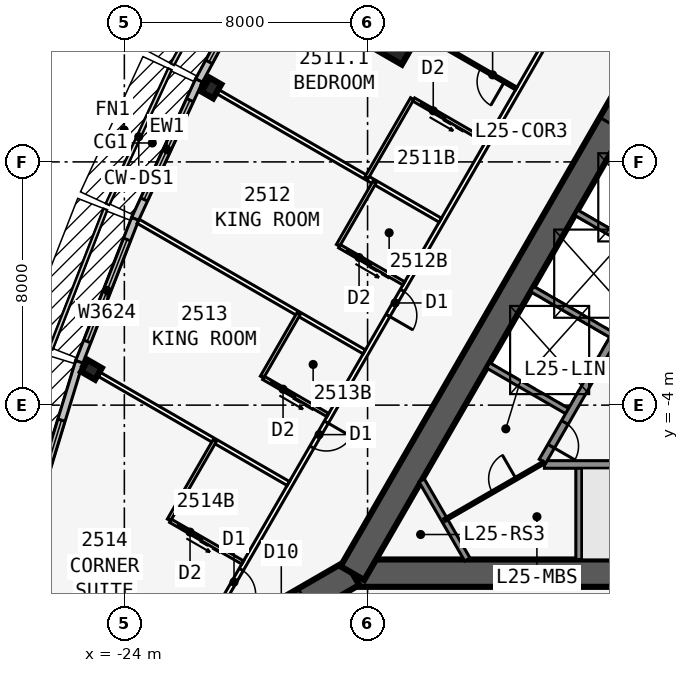
"""IFC4 building model, lengths in metres.
Left out: names, types, materials, properties, quantities, classifications, styles, units other than length and angle.
Written with IfcOpenShell. Run it as: python <this file> out.ifc"""

import sys

from ifc_helpers import new_model, si_unit, direction, frame, frame_2d, origin, origin_2d, place, context, subcontext, project, spatial, rectangle, i_section, extrude, element, fill, save


model = new_model("IFC4")
c1 = context("Model", 3, precision=1e-05, world=origin(), true_north=direction((0.0, 1.0)))
c2 = subcontext(c1, "Body", "Model", "MODEL_VIEW")
j1 = project(units=[si_unit("LENGTHUNIT", "METRE"), si_unit("PLANEANGLEUNIT", "RADIAN")], contexts=[c1])
p1 = place(None, origin())
s1 = spatial("IfcSite", under=j1, at=p1, CompositionType="ELEMENT")
p2 = place(p1, origin())
s2 = spatial("IfcBuilding", under=s1, at=p2, CompositionType="ELEMENT")
p3 = place(p2, frame((0.0, 0.0, 96.5)))
s3 = spatial("IfcBuildingStorey", under=s2, at=p3, CompositionType="ELEMENT", Elevation=96.5)
p4 = place(p3, frame((-16.5, -9.526, 0.0), z_axis=(0.0, 0.0, 1.0), x_axis=(1.0, 0.0, 0.0)))
e1 = element("IfcWall", 1, at=p4, inside=s3, PredefinedType="SHEAR", context=c2, shape_type="SweptSolid", body=[
    extrude(rectangle(XDim=33.0, YDim=0.9, at=frame_2d((16.5, 0.0))), origin(), (0.0, 0.0, 1.0), 3.4),
])
p5 = place(p4, frame((14.05, 0.0, 0.0)))
e2 = element("IfcOpeningElement", 2, at=p5, cuts=e1, PredefinedType="OPENING", context=c2, shape_type="SweptSolid", body=[
    extrude(rectangle(XDim=1.8, YDim=2.13, at=frame_2d((0.9, 1.065))), frame((0.0, 0.46, 0.0), z_axis=(0.0, -1.0, 0.0), x_axis=(1.0, 0.0, 0.0)), (0.0, 0.0, 1.0), 0.92),
])
p6 = place(p3, frame((-10.183, -5.951, 0.0), z_axis=(0.0, 0.0, 1.0), x_axis=(1.0, 0.0, 0.0)))
e3 = element("IfcWall", 3, at=p6, inside=s3, PredefinedType="SOLIDWALL", context=c2, shape_type="SweptSolid", body=[
    extrude(rectangle(XDim=7.633, YDim=0.25, at=frame_2d((3.816, 0.0))), origin(), (0.0, 0.0, 1.0), 3.235),
])
p7 = place(p3, frame((-9.05, -5.951, 0.0), z_axis=(0.0, 0.0, 1.0), x_axis=(0.0, -1.0, 0.0)))
e4 = element("IfcWall", 4, at=p7, inside=s3, PredefinedType="SOLIDWALL", context=c2, shape_type="SweptSolid", body=[
    extrude(rectangle(XDim=3.125, YDim=0.2, at=frame_2d((1.562, 0.0))), origin(), (0.0, 0.0, 1.0), 3.235),
])
p8 = place(p3, frame((0.0, 19.052, 0.0), z_axis=(0.0, 0.0, 1.0), x_axis=(-0.499999749417, -0.866025548458, 0.0)))
e5 = element("IfcWall", 5, at=p8, inside=s3, PredefinedType="SHEAR", context=c2, shape_type="SweptSolid", body=[
    extrude(rectangle(XDim=33.0, YDim=0.9, at=frame_2d((16.5, 0.0))), origin(), (0.0, 0.0, 1.0), 3.4),
])
p9 = place(p8, frame((14.15, 0.0, 0.0)))
e6 = element("IfcOpeningElement", 6, at=p9, cuts=e5, PredefinedType="OPENING", context=c2, shape_type="SweptSolid", body=[
    extrude(rectangle(XDim=1.8, YDim=2.13, at=frame_2d((0.9, 1.065))), frame((0.0, 0.46, 0.0), z_axis=(0.0, -1.0, 0.0), x_axis=(1.0, 0.0, 0.0)), (0.0, 0.0, 1.0), 0.92),
])
p10 = place(p8, frame((12.6, 0.0, 0.0)))
e7 = element("IfcOpeningElement", 7, at=p10, cuts=e5, PredefinedType="OPENING", context=c2, shape_type="SweptSolid", body=[
    extrude(rectangle(XDim=1.0, YDim=2.13, at=frame_2d((0.5, 1.065))), frame((0.0, 0.46, 0.0), z_axis=(0.0, -1.0, 0.0), x_axis=(1.0, 0.0, 0.0)), (0.0, 0.0, 1.0), 0.92),
])
p11 = place(p3, frame((-4.929, 3.365, 0.0), z_axis=(0.0, 0.0, 1.0), x_axis=(-0.499991433582, -0.866030349552, 0.0)))
e8 = element("IfcWall", 8, at=p11, inside=s3, PredefinedType="SOLIDWALL", context=c2, shape_type="SweptSolid", body=[
    extrude(rectangle(XDim=10.633, YDim=0.25, at=frame_2d((5.316, 0.0))), origin(), (0.0, 0.0, 1.0), 3.235),
])
p12 = place(p11, frame((9.164, 0.0, 0.0)))
e9 = element("IfcOpeningElement", 9, at=p12, cuts=e8, PredefinedType="OPENING", context=c2, shape_type="SweptSolid", body=[
    extrude(rectangle(XDim=0.9, YDim=2.13, at=frame_2d((0.45, 1.065))), frame((0.0, 0.135, 0.0), z_axis=(0.0, -1.0, 0.0), x_axis=(1.0, 0.0, 0.0)), (0.0, 0.0, 1.0), 0.27),
])
for number, where, z_axis, x_axis in (
    (10, (-6.429, 0.767, 0.0), (0.0, 0.0, 1.0), (-0.866, 0.5, 0.0)),
    (11, (-7.879, -1.744, 0.0), (0.0, 0.0, 1.0), (-0.866, 0.5, 0.0)),
    (12, (-9.329, -4.256, 0.0), (0.0, 0.0, 1.0), (-0.866, 0.5, 0.0)),
):
    element("IfcWall", number, at=place(p3, frame(where, z_axis=z_axis, x_axis=x_axis)), inside=s3, PredefinedType="SOLIDWALL", context=c2, shape_type="SweptSolid", body=[
        extrude(rectangle(XDim=3.125, YDim=0.2, at=frame_2d((1.562, 0.0))), origin(), (0.0, 0.0, 1.0), 3.235),
    ])
p13 = place(p3, frame((-16.5, -9.526, 0.0), z_axis=(0.0, 0.0, 1.0), x_axis=(-0.866031398331, -0.499989616998, 0.0)))
e13 = element("IfcWall", 13, at=p13, inside=s3, PredefinedType="SHEAR", context=c2, shape_type="SweptSolid", body=[
    extrude(rectangle(XDim=4.746, YDim=0.9, at=frame_2d((2.373, 0.0))), origin(), (0.0, 0.0, 1.0), 3.4),
])
p14 = place(p13, frame((1.8, 0.0, 0.0)))
e14 = element("IfcOpeningElement", 14, at=p14, cuts=e13, PredefinedType="OPENING", context=c2, shape_type="SweptSolid", body=[
    extrude(rectangle(XDim=1.8, YDim=2.13, at=frame_2d((0.9, 1.065))), frame((0.0, 0.46, 0.0), z_axis=(0.0, -1.0, 0.0), x_axis=(1.0, 0.0, 0.0)), (0.0, 0.0, 1.0), 0.92),
])
for number, where, z_axis, x_axis in (
    (15, (-21.137, 6.43, 0.0), (0.0, 0.0, 1.0), (-0.866, 0.5, 0.0)),
    (16, (-25.083, -2.839, 0.0), (0.0, 0.0, 1.0), (-0.5, -0.866, 0.0)),
):
    element("IfcColumn", number, at=place(p3, frame(where, z_axis=z_axis, x_axis=x_axis)), inside=s3, PredefinedType="COLUMN", context=c2, shape_type="SweptSolid", body=[
        extrude(i_section(OverallWidth=0.442, OverallDepth=0.531, WebThickness=0.066, FlangeThickness=0.106, at=origin_2d()), origin(), (0.0, 0.0, 1.0), 3.4),
    ])
p15 = place(p3, frame((-15.312, 8.84, 0.0), z_axis=(0.0, 0.0, 1.0), x_axis=(-0.866025403784, 0.5, 0.0)))
e17 = element("IfcColumn", 17, at=p15, inside=s3, PredefinedType="COLUMN", context=c2, shape_type="SweptSolid", body=[
    extrude(rectangle(XDim=2.4, YDim=2.4, at=origin_2d()), origin(), (0.0, 0.0, 1.0), 3.4),
])
p16 = place(p3, frame((-19.178, 11.077, 0.0), z_axis=(0.0, 0.0, 1.0), x_axis=(-0.473412820489, -0.880840678782, 0.0)))
e18 = element("IfcWall", 18, at=p16, inside=s3, PredefinedType="STANDARD", context=c2, shape_type="SweptSolid", body=[
    extrude(rectangle(XDim=5.002, YDim=0.25, at=frame_2d((2.501, 0.0))), origin(), (0.0, 0.0, 1.0), 3.235),
])
p17 = place(p16, frame((0.701, 0.0, 0.45)))
e19 = element("IfcOpeningElement", 19, at=p17, cuts=e18, PredefinedType="OPENING", context=c2, shape_type="SweptSolid", body=[
    extrude(rectangle(XDim=3.6, YDim=2.4, at=frame_2d((1.8, 1.2))), frame((0.0, 0.135, 0.0), z_axis=(0.0, -1.0, 0.0), x_axis=(1.0, 0.0, 0.0)), (0.0, 0.0, 1.0), 0.27),
])
p18 = place(p3, frame((-21.543, 6.678, 0.0), z_axis=(0.0, 0.0, 1.0), x_axis=(-0.419203100754, -0.907892482796, 0.0)))
e20 = element("IfcWall", 20, at=p18, inside=s3, PredefinedType="STANDARD", context=c2, shape_type="SweptSolid", body=[
    extrude(rectangle(XDim=5.021, YDim=0.25, at=frame_2d((2.51, 0.0))), origin(), (0.0, 0.0, 1.0), 3.235),
])
p19 = place(p18, frame((0.71, 0.0, 0.45)))
e21 = element("IfcOpeningElement", 21, at=p19, cuts=e20, PredefinedType="OPENING", context=c2, shape_type="SweptSolid", body=[
    extrude(rectangle(XDim=3.6, YDim=2.4, at=frame_2d((1.8, 1.2))), frame((0.0, 0.135, 0.0), z_axis=(0.0, -1.0, 0.0), x_axis=(1.0, 0.0, 0.0)), (0.0, 0.0, 1.0), 0.27),
])
p20 = place(p3, frame((-23.645, 2.126, 0.0), z_axis=(0.0, 0.0, 1.0), x_axis=(-0.364013463868, -0.931393685894, 0.0)))
e22 = element("IfcWall", 22, at=p20, inside=s3, PredefinedType="STANDARD", context=c2, shape_type="SweptSolid", body=[
    extrude(rectangle(XDim=5.058, YDim=0.25, at=frame_2d((2.529, 0.0))), origin(), (0.0, 0.0, 1.0), 3.235),
])
p21 = place(p20, frame((0.729, 0.0, 0.45)))
e23 = element("IfcOpeningElement", 23, at=p21, cuts=e22, PredefinedType="OPENING", context=c2, shape_type="SweptSolid", body=[
    extrude(rectangle(XDim=3.6, YDim=2.4, at=frame_2d((1.8, 1.2))), frame((0.0, 0.135, 0.0), z_axis=(0.0, -1.0, 0.0), x_axis=(1.0, 0.0, 0.0)), (0.0, 0.0, 1.0), 0.27),
])
p22 = place(p3, frame((-25.483, -2.575, 0.0), z_axis=(0.0, 0.0, 1.0), x_axis=(-0.2919790669, -0.956424709265, 0.0)))
e24 = element("IfcWall", 24, at=p22, inside=s3, PredefinedType="STANDARD", context=c2, shape_type="SweptSolid", body=[
    extrude(rectangle(XDim=8.211, YDim=0.25, at=frame_2d((4.105, 0.0))), origin(), (0.0, 0.0, 1.0), 3.235),
])
p23 = place(p22, frame((2.006, 0.0, 0.45)))
e25 = element("IfcOpeningElement", 25, at=p23, cuts=e24, PredefinedType="OPENING", context=c2, shape_type="SweptSolid", body=[
    extrude(rectangle(XDim=4.2, YDim=2.4, at=frame_2d((2.1, 1.2))), frame((0.0, 0.135, 0.0), z_axis=(0.0, -1.0, 0.0), x_axis=(1.0, 0.0, 0.0)), (0.0, 0.0, 1.0), 0.27),
])
p24 = place(p3, frame((-0.5, 24.636, 0.0), z_axis=(0.0, 0.0, 1.0), x_axis=(-0.500001915564, -0.86602429783, 0.0)))
e26 = element("IfcWall", 26, at=p24, inside=s3, PredefinedType="PARTITIONING", context=c2, shape_type="SweptSolid", body=[
    extrude(rectangle(XDim=42.172, YDim=0.15, at=frame_2d((21.086, 0.0))), origin(), (0.0, 0.0, 1.0), 3.235),
])
p25 = place(p24, frame((1.911, 0.0, 0.0)))
e27 = element("IfcOpeningElement", 27, at=p25, cuts=e26, PredefinedType="OPENING", context=c2, shape_type="SweptSolid", body=[
    extrude(rectangle(XDim=0.95, YDim=2.13, at=frame_2d((0.475, 1.065))), frame((0.0, 0.085, 0.0), z_axis=(0.0, -1.0, 0.0), x_axis=(1.0, 0.0, 0.0)), (0.0, 0.0, 1.0), 0.17),
])
p26 = place(p24, frame((8.111, 0.0, 0.0)))
e28 = element("IfcOpeningElement", 28, at=p26, cuts=e26, PredefinedType="OPENING", context=c2, shape_type="SweptSolid", body=[
    extrude(rectangle(XDim=0.95, YDim=2.13, at=frame_2d((0.475, 1.065))), frame((0.0, 0.085, 0.0), z_axis=(0.0, -1.0, 0.0), x_axis=(1.0, 0.0, 0.0)), (0.0, 0.0, 1.0), 0.17),
])
p27 = place(p24, frame((18.111, 0.0, 0.0)))
e29 = element("IfcOpeningElement", 29, at=p27, cuts=e26, PredefinedType="OPENING", context=c2, shape_type="SweptSolid", body=[
    extrude(rectangle(XDim=0.95, YDim=2.13, at=frame_2d((0.475, 1.065))), frame((0.0, 0.085, 0.0), z_axis=(0.0, -1.0, 0.0), x_axis=(1.0, 0.0, 0.0)), (0.0, 0.0, 1.0), 0.17),
])
p28 = place(p24, frame((28.711, 0.0, 0.0)))
e30 = element("IfcOpeningElement", 30, at=p28, cuts=e26, PredefinedType="OPENING", context=c2, shape_type="SweptSolid", body=[
    extrude(rectangle(XDim=0.95, YDim=2.13, at=frame_2d((0.475, 1.065))), frame((0.0, 0.085, 0.0), z_axis=(0.0, -1.0, 0.0), x_axis=(1.0, 0.0, 0.0)), (0.0, 0.0, 1.0), 0.17),
])
p29 = place(p24, frame((33.711, 0.0, 0.0)))
e31 = element("IfcOpeningElement", 31, at=p29, cuts=e26, PredefinedType="OPENING", context=c2, shape_type="SweptSolid", body=[
    extrude(rectangle(XDim=0.95, YDim=2.13, at=frame_2d((0.475, 1.065))), frame((0.0, 0.085, 0.0), z_axis=(0.0, -1.0, 0.0), x_axis=(1.0, 0.0, 0.0)), (0.0, 0.0, 1.0), 0.17),
])
p30 = place(p24, frame((39.311, 0.0, 0.0)))
e32 = element("IfcOpeningElement", 32, at=p30, cuts=e26, PredefinedType="OPENING", context=c2, shape_type="SweptSolid", body=[
    extrude(rectangle(XDim=0.95, YDim=2.13, at=frame_2d((0.475, 1.065))), frame((0.0, 0.085, 0.0), z_axis=(0.0, -1.0, 0.0), x_axis=(1.0, 0.0, 0.0)), (0.0, 0.0, 1.0), 0.17),
])
p31 = place(p3, frame((-11.108, 6.413, 0.0), z_axis=(0.0, 0.0, 1.0), x_axis=(-0.866022450903, 0.500005114506, 0.0)))
e33 = element("IfcWall", 33, at=p31, inside=s3, PredefinedType="PARTITIONING", context=c2, shape_type="SweptSolid", body=[
    extrude(rectangle(XDim=9.196, YDim=0.1, at=frame_2d((4.598, 0.0))), origin(), (0.0, 0.0, 1.0), 2.389),
])
p32 = place(p31, frame((0.45, 0.0, 0.0)))
e34 = element("IfcOpeningElement", 34, at=p32, cuts=e33, PredefinedType="OPENING", context=c2, shape_type="SweptSolid", body=[
    extrude(rectangle(XDim=0.9, YDim=2.13, at=frame_2d((0.45, 1.065))), frame((0.0, 0.06, 0.0), z_axis=(0.0, -1.0, 0.0), x_axis=(1.0, 0.0, 0.0)), (0.0, 0.0, 1.0), 0.12),
])
p33 = place(p3, frame((-13.608, 2.083, 0.0), z_axis=(0.0, 0.0, 1.0), x_axis=(-0.866028232062, 0.499995101247, 0.0)))
e35 = element("IfcWall", 35, at=p33, inside=s3, PredefinedType="PARTITIONING", context=c2, shape_type="SweptSolid", body=[
    extrude(rectangle(XDim=9.043, YDim=0.15, at=frame_2d((4.521, 0.0))), origin(), (0.0, 0.0, 1.0), 2.389),
])
p34 = place(p3, frame((-16.108, -2.247, 0.0), z_axis=(0.0, 0.0, 1.0), x_axis=(-0.866018881988, 0.500011295912, 0.0)))
e36 = element("IfcWall", 36, at=p34, inside=s3, PredefinedType="PARTITIONING", context=c2, shape_type="SweptSolid", body=[
    extrude(rectangle(XDim=8.585, YDim=0.15, at=frame_2d((4.292, 0.0))), origin(), (0.0, 0.0, 1.0), 2.389),
])
p35 = place(p3, frame((-18.608, -6.577, 0.0), z_axis=(0.0, 0.0, 1.0), x_axis=(-0.866034818847, 0.499983692279, 0.0)))
e37 = element("IfcWall", 37, at=p35, inside=s3, PredefinedType="PARTITIONING", context=c2, shape_type="SweptSolid", body=[
    extrude(rectangle(XDim=7.82, YDim=0.15, at=frame_2d((3.91, 0.0))), origin(), (0.0, 0.0, 1.0), 2.389),
])
p36 = place(p3, frame((-14.533, 6.081, 0.0), z_axis=(0.0, 0.0, 1.0), x_axis=(-0.499990139034, -0.866031096941, 0.0)))
e38 = element("IfcWall", 38, at=p36, inside=s3, PredefinedType="PLUMBINGWALL", context=c2, shape_type="SweptSolid", body=[
    extrude(rectangle(XDim=3.0, YDim=0.12, at=frame_2d((1.5, 0.0))), origin(), (0.0, 0.0, 1.0), 3.235),
])
p37 = place(p3, frame((-12.108, 4.681, 0.0), z_axis=(0.0, 0.0, 1.0), x_axis=(-0.866035715982, 0.499982138324, 0.0)))
e39 = element("IfcWall", 39, at=p37, inside=s3, PredefinedType="PLUMBINGWALL", context=c2, shape_type="SweptSolid", body=[
    extrude(rectangle(XDim=2.74, YDim=0.12, at=frame_2d((1.37, 0.0))), origin(), (0.0, 0.0, 1.0), 3.235),
])
p38 = place(p37, frame((1.55, 0.0, 0.0)))
e40 = element("IfcOpeningElement", 40, at=p38, cuts=e39, PredefinedType="OPENING", context=c2, shape_type="SweptSolid", body=[
    extrude(rectangle(XDim=0.9, YDim=2.13, at=frame_2d((0.45, 1.065))), frame((0.0, 0.07, 0.0), z_axis=(0.0, -1.0, 0.0), x_axis=(1.0, 0.0, 0.0)), (0.0, 0.0, 1.0), 0.14),
])
p39 = place(p3, frame((-15.773, 3.333, 0.0), z_axis=(0.0, 0.0, 1.0), x_axis=(-0.500001309137, -0.866024647952, 0.0)))
e41 = element("IfcWall", 41, at=p39, inside=s3, PredefinedType="PLUMBINGWALL", context=c2, shape_type="SweptSolid", body=[
    extrude(rectangle(XDim=2.4, YDim=0.12, at=frame_2d((1.2, 0.0))), origin(), (0.0, 0.0, 1.0), 3.235),
])
p40 = place(p3, frame((-14.808, 0.005, 0.0), z_axis=(0.0, 0.0, 1.0), x_axis=(-0.866023955769, 0.500002508028, 0.0)))
e42 = element("IfcWall", 42, at=p40, inside=s3, PredefinedType="PLUMBINGWALL", context=c2, shape_type="SweptSolid", body=[
    extrude(rectangle(XDim=2.44, YDim=0.12, at=frame_2d((1.22, 0.0))), origin(), (0.0, 0.0, 1.0), 3.235),
])
p41 = place(p40, frame((1.25, 0.0, 0.0)))
e43 = element("IfcOpeningElement", 43, at=p41, cuts=e42, PredefinedType="OPENING", context=c2, shape_type="SweptSolid", body=[
    extrude(rectangle(XDim=0.9, YDim=2.13, at=frame_2d((0.45, 1.065))), frame((0.0, 0.07, 0.0), z_axis=(0.0, -1.0, 0.0), x_axis=(1.0, 0.0, 0.0)), (0.0, 0.0, 1.0), 0.14),
])
p42 = place(p3, frame((-18.273, -0.997, 0.0), z_axis=(0.0, 0.0, 1.0), x_axis=(-0.499957262057, -0.866050077142, 0.0)))
e44 = element("IfcWall", 44, at=p42, inside=s3, PredefinedType="PLUMBINGWALL", context=c2, shape_type="SweptSolid", body=[
    extrude(rectangle(XDim=2.4, YDim=0.12, at=frame_2d((1.2, 0.0))), origin(), (0.0, 0.0, 1.0), 3.235),
])
p43 = place(p3, frame((-17.308, -4.326, 0.0), z_axis=(0.0, 0.0, 1.0), x_axis=(-0.866023955769, 0.500002508028, 0.0)))
e45 = element("IfcWall", 45, at=p43, inside=s3, PredefinedType="PLUMBINGWALL", context=c2, shape_type="SweptSolid", body=[
    extrude(rectangle(XDim=2.44, YDim=0.12, at=frame_2d((1.22, 0.0))), origin(), (0.0, 0.0, 1.0), 3.235),
])
p44 = place(p43, frame((1.25, 0.0, 0.0)))
e46 = element("IfcOpeningElement", 46, at=p44, cuts=e45, PredefinedType="OPENING", context=c2, shape_type="SweptSolid", body=[
    extrude(rectangle(XDim=0.9, YDim=2.13, at=frame_2d((0.45, 1.065))), frame((0.0, 0.07, 0.0), z_axis=(0.0, -1.0, 0.0), x_axis=(1.0, 0.0, 0.0)), (0.0, 0.0, 1.0), 0.14),
])
p45 = place(p3, frame((-21.033, -5.177, 0.0), z_axis=(0.0, 0.0, 1.0), x_axis=(-0.499990139034, -0.866031096941, 0.0)))
e47 = element("IfcWall", 47, at=p45, inside=s3, PredefinedType="PLUMBINGWALL", context=c2, shape_type="SweptSolid", body=[
    extrude(rectangle(XDim=3.0, YDim=0.12, at=frame_2d((1.5, 0.0))), origin(), (0.0, 0.0, 1.0), 3.235),
])
p46 = place(p3, frame((-20.108, -9.175, 0.0), z_axis=(0.0, 0.0, 1.0), x_axis=(-0.866035715982, 0.499982138324, 0.0)))
e48 = element("IfcWall", 48, at=p46, inside=s3, PredefinedType="PLUMBINGWALL", context=c2, shape_type="SweptSolid", body=[
    extrude(rectangle(XDim=2.74, YDim=0.12, at=frame_2d((1.37, 0.0))), origin(), (0.0, 0.0, 1.0), 3.235),
])
p47 = place(p46, frame((1.55, 0.0, 0.0)))
e49 = element("IfcOpeningElement", 49, at=p47, cuts=e48, PredefinedType="OPENING", context=c2, shape_type="SweptSolid", body=[
    extrude(rectangle(XDim=0.9, YDim=2.13, at=frame_2d((0.45, 1.065))), frame((0.0, 0.07, 0.0), z_axis=(0.0, -1.0, 0.0), x_axis=(1.0, 0.0, 0.0)), (0.0, 0.0, 1.0), 0.14),
])
p48 = place(p3, frame((-12.719, -9.076, 0.0), z_axis=(0.0, 0.0, 1.0), x_axis=(-0.499952404951, 0.866052881055, 0.0)))
e50 = element("IfcWall", 50, at=p48, inside=s3, PredefinedType="SOLIDWALL", context=c2, shape_type="SweptSolid", body=[
    extrude(rectangle(XDim=3.002, YDim=0.2, at=frame_2d((1.501, 0.0))), origin(), (0.0, 0.0, 1.0), 3.235),
])
p49 = place(p3, frame((-13.469, -7.776, 0.0), z_axis=(0.0, 0.0, 1.0), x_axis=(0.866021898093, 0.500006071987, 0.0)))
e51 = element("IfcWall", 51, at=p49, inside=s3, PredefinedType="PARTITIONING", context=c2, shape_type="SweptSolid", body=[
    extrude(rectangle(XDim=3.775, YDim=0.1, at=frame_2d((1.888, 0.0))), origin(), (0.0, 0.0, 1.0), 3.235),
])
p50 = place(p49, frame((1.815, 0.0, 0.0)))
e52 = element("IfcOpeningElement", 52, at=p50, cuts=e51, PredefinedType="OPENING", context=c2, shape_type="SweptSolid", body=[
    extrude(rectangle(XDim=0.9, YDim=2.13, at=frame_2d((0.45, 1.065))), frame((0.0, 0.06, 0.0), z_axis=(0.0, -1.0, 0.0), x_axis=(1.0, 0.0, 0.0)), (0.0, 0.0, 1.0), 0.12),
])
p51 = place(p17, origin())
e53 = element("IfcWindow", 53, at=p51, inside=s3, PartitioningType="SINGLE_PANEL", PredefinedType="WINDOW", context=c2, shape_type="SweptSolid", body=[
    extrude(rectangle(XDim=3.6, YDim=2.4, at=frame_2d((1.8, 1.2))), frame((0.0, 0.03, 0.0), z_axis=(0.0, -1.0, 0.0), x_axis=(1.0, 0.0, 0.0)), (0.0, 0.0, 1.0), 0.06),
])
fill(e19, e53)
p52 = place(p19, origin())
e54 = element("IfcWindow", 54, at=p52, inside=s3, PartitioningType="SINGLE_PANEL", PredefinedType="WINDOW", context=c2, shape_type="SweptSolid", body=[
    extrude(rectangle(XDim=3.6, YDim=2.4, at=frame_2d((1.8, 1.2))), frame((0.0, 0.03, 0.0), z_axis=(0.0, -1.0, 0.0), x_axis=(1.0, 0.0, 0.0)), (0.0, 0.0, 1.0), 0.06),
])
fill(e21, e54)
p53 = place(p21, origin())
e55 = element("IfcWindow", 55, at=p53, inside=s3, PartitioningType="SINGLE_PANEL", PredefinedType="WINDOW", context=c2, shape_type="SweptSolid", body=[
    extrude(rectangle(XDim=3.6, YDim=2.4, at=frame_2d((1.8, 1.2))), frame((0.0, 0.03, 0.0), z_axis=(0.0, -1.0, 0.0), x_axis=(1.0, 0.0, 0.0)), (0.0, 0.0, 1.0), 0.06),
])
fill(e23, e55)
p54 = place(p23, origin())
e56 = element("IfcWindow", 56, at=p54, inside=s3, PartitioningType="SINGLE_PANEL", PredefinedType="WINDOW", context=c2, shape_type="SweptSolid", body=[
    extrude(rectangle(XDim=4.2, YDim=2.4, at=frame_2d((2.1, 1.2))), frame((0.0, 0.03, 0.0), z_axis=(0.0, -1.0, 0.0), x_axis=(1.0, 0.0, 0.0)), (0.0, 0.0, 1.0), 0.06),
])
fill(e25, e56)
p55 = place(p32, origin())
e57 = element("IfcDoor", 57, at=p55, inside=s3, OperationType="SINGLE_SWING_LEFT", PredefinedType="DOOR", context=c2, shape_type="SweptSolid", body=[
    extrude(rectangle(XDim=0.9, YDim=2.13, at=frame_2d((0.45, 1.065))), frame((0.0, 0.025, 0.0), z_axis=(0.0, -1.0, 0.0), x_axis=(1.0, 0.0, 0.0)), (0.0, 0.0, 1.0), 0.05),
])
fill(e34, e57)
p56 = place(p38, origin())
e58 = element("IfcDoor", 58, at=p56, inside=s3, OperationType="SLIDING_TO_LEFT", PredefinedType="DOOR", context=c2, shape_type="SweptSolid", body=[
    extrude(rectangle(XDim=0.9, YDim=2.13, at=frame_2d((0.45, 1.065))), frame((0.0, 0.025, 0.0), z_axis=(0.0, -1.0, 0.0), x_axis=(1.0, 0.0, 0.0)), (0.0, 0.0, 1.0), 0.05),
])
fill(e40, e58)
p57 = place(p41, origin())
e59 = element("IfcDoor", 59, at=p57, inside=s3, OperationType="SLIDING_TO_LEFT", PredefinedType="DOOR", context=c2, shape_type="SweptSolid", body=[
    extrude(rectangle(XDim=0.9, YDim=2.13, at=frame_2d((0.45, 1.065))), frame((0.0, 0.025, 0.0), z_axis=(0.0, -1.0, 0.0), x_axis=(1.0, 0.0, 0.0)), (0.0, 0.0, 1.0), 0.05),
])
fill(e43, e59)
p58 = place(p28, origin())
e60 = element("IfcDoor", 60, at=p58, inside=s3, OperationType="SINGLE_SWING_RIGHT", PredefinedType="DOOR", context=c2, shape_type="SweptSolid", body=[
    extrude(rectangle(XDim=0.95, YDim=2.13, at=frame_2d((0.475, 1.065))), frame((0.0, 0.025, 0.0), z_axis=(0.0, -1.0, 0.0), x_axis=(1.0, 0.0, 0.0)), (0.0, 0.0, 1.0), 0.05),
])
fill(e30, e60)
p59 = place(p44, origin())
e61 = element("IfcDoor", 61, at=p59, inside=s3, OperationType="SLIDING_TO_LEFT", PredefinedType="DOOR", context=c2, shape_type="SweptSolid", body=[
    extrude(rectangle(XDim=0.9, YDim=2.13, at=frame_2d((0.45, 1.065))), frame((0.0, 0.025, 0.0), z_axis=(0.0, -1.0, 0.0), x_axis=(1.0, 0.0, 0.0)), (0.0, 0.0, 1.0), 0.05),
])
fill(e46, e61)
p60 = place(p29, origin())
e62 = element("IfcDoor", 62, at=p60, inside=s3, OperationType="SINGLE_SWING_LEFT", PredefinedType="DOOR", context=c2, shape_type="SweptSolid", body=[
    extrude(rectangle(XDim=0.95, YDim=2.13, at=frame_2d((0.475, 1.065))), frame((0.0, 0.025, 0.0), z_axis=(0.0, -1.0, 0.0), x_axis=(1.0, 0.0, 0.0)), (0.0, 0.0, 1.0), 0.05),
])
fill(e31, e62)
p61 = place(p47, origin())
e63 = element("IfcDoor", 63, at=p61, inside=s3, OperationType="SLIDING_TO_LEFT", PredefinedType="DOOR", context=c2, shape_type="SweptSolid", body=[
    extrude(rectangle(XDim=0.9, YDim=2.13, at=frame_2d((0.45, 1.065))), frame((0.0, 0.025, 0.0), z_axis=(0.0, -1.0, 0.0), x_axis=(1.0, 0.0, 0.0)), (0.0, 0.0, 1.0), 0.05),
])
fill(e49, e63)
p62 = place(p30, origin())
e64 = element("IfcDoor", 64, at=p62, inside=s3, OperationType="SINGLE_SWING_RIGHT", PredefinedType="DOOR", context=c2, shape_type="SweptSolid", body=[
    extrude(rectangle(XDim=0.95, YDim=2.13, at=frame_2d((0.475, 1.065))), frame((0.0, 0.025, 0.0), z_axis=(0.0, -1.0, 0.0), x_axis=(1.0, 0.0, 0.0)), (0.0, 0.0, 1.0), 0.05),
])
fill(e32, e64)
p63 = place(p12, origin())
e65 = element("IfcDoor", 65, at=p63, inside=s3, OperationType="SINGLE_SWING_RIGHT", PredefinedType="DOOR", context=c2, shape_type="SweptSolid", body=[
    extrude(rectangle(XDim=0.9, YDim=2.13, at=frame_2d((0.45, 1.065))), frame((0.0, 0.025, 0.0), z_axis=(0.0, -1.0, 0.0), x_axis=(1.0, 0.0, 0.0)), (0.0, 0.0, 1.0), 0.05),
])
fill(e9, e65)
p64 = place(p50, origin())
e66 = element("IfcDoor", 66, at=p64, inside=s3, OperationType="SINGLE_SWING_RIGHT", PredefinedType="DOOR", context=c2, shape_type="SweptSolid", body=[
    extrude(rectangle(XDim=0.9, YDim=2.13, at=frame_2d((0.45, 1.065))), frame((0.0, 0.025, 0.0), z_axis=(0.0, -1.0, 0.0), x_axis=(1.0, 0.0, 0.0)), (0.0, 0.0, 1.0), 0.05),
])
fill(e52, e66)
save(model, sys.argv[1])
